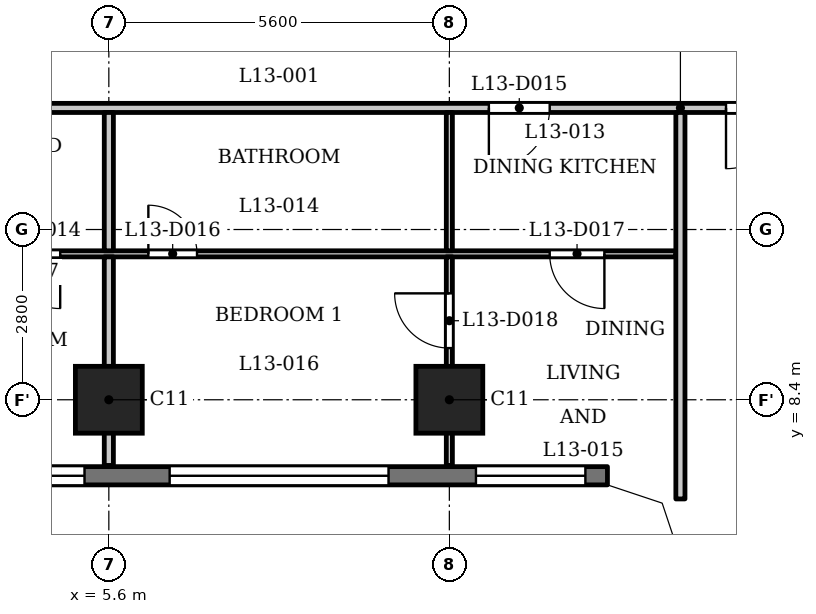
"""IFC4 building model, lengths in metres.
Left out: names, types, materials, properties, quantities, classifications, styles, units other than length and angle.
Written with IfcOpenShell. Run it as: python <this file> out.ifc"""

import sys

from ifc_helpers import new_model, si_unit, direction, frame, frame_2d, origin, origin_2d, place, context, subcontext, project, spatial, polyline, rectangle, outline, extrude, element, fill, save


model = new_model("IFC4")
c1 = context("Model", 3, precision=1e-05, world=origin(), true_north=direction((0.0, 1.0)))
c2 = subcontext(c1, "Body", "Model", "MODEL_VIEW")
j1 = project(units=[si_unit("LENGTHUNIT", "METRE"), si_unit("PLANEANGLEUNIT", "RADIAN")], contexts=[c1])
p1 = place(None, origin())
s1 = spatial("IfcSite", under=j1, at=p1, CompositionType="ELEMENT")
p2 = place(p1, origin())
s2 = spatial("IfcBuilding", under=s1, at=p2, CompositionType="ELEMENT")
p3 = place(p2, frame((0.0, 0.0, 55.0)))
s3 = spatial("IfcBuildingStorey", under=s2, at=p3, CompositionType="ELEMENT", Elevation=55.0)
for number, where, z_axis, x_axis in (
    (1, (5.6, 8.4, 0.0), (0.0, 0.0, 1.0), (1.0, 0.0, 0.0)),
    (2, (11.2, 8.4, 0.0), (0.0, 0.0, 1.0), (1.0, 0.0, 0.0)),
):
    element("IfcColumn", number, at=place(p3, frame(where, z_axis=z_axis, x_axis=x_axis)), inside=s3, PredefinedType="COLUMN", context=c2, shape_type="SweptSolid", body=[
        extrude(rectangle(XDim=1.1, YDim=1.1, at=origin_2d()), origin(), (0.0, 0.0, 1.0), 3.5),
    ])
p4 = place(p3, frame((-13.8, 7.15, 0.0), z_axis=(0.0, 0.0, 1.0), x_axis=(1.0, 0.0, 0.0)))
e3 = element("IfcWall", 3, at=p4, inside=s3, PredefinedType="SOLIDWALL", context=c2, shape_type="SweptSolid", body=[
    extrude(rectangle(XDim=27.6, YDim=0.3, at=frame_2d((13.8, 0.0))), origin(), (0.0, 0.0, 1.0), 3.2),
])
p5 = place(p4, frame((0.363, 0.0, 0.9)))
e4 = element("IfcOpeningElement", 4, at=p5, cuts=e3, PredefinedType="OPENING", context=c2, shape_type="SweptSolid", body=[
    extrude(rectangle(XDim=1.8, YDim=1.25, at=frame_2d((0.9, 0.625))), frame((0.0, 0.16, 0.0), z_axis=(0.0, -1.0, 0.0), x_axis=(1.0, 0.0, 0.0)), (0.0, 0.0, 1.0), 0.32),
])
p6 = place(p4, frame((3.6, 0.0, 1.2)))
e5 = element("IfcOpeningElement", 5, at=p6, cuts=e3, PredefinedType="OPENING", context=c2, shape_type="SweptSolid", body=[
    extrude(rectangle(XDim=3.6, YDim=0.95, at=frame_2d((1.8, 0.475))), frame((0.0, 0.16, 0.0), z_axis=(0.0, -1.0, 0.0), x_axis=(1.0, 0.0, 0.0)), (0.0, 0.0, 1.0), 0.32),
])
p7 = place(p4, frame((9.2, 0.0, 1.2)))
e6 = element("IfcOpeningElement", 6, at=p7, cuts=e3, PredefinedType="OPENING", context=c2, shape_type="SweptSolid", body=[
    extrude(rectangle(XDim=3.6, YDim=0.95, at=frame_2d((1.8, 0.475))), frame((0.0, 0.16, 0.0), z_axis=(0.0, -1.0, 0.0), x_axis=(1.0, 0.0, 0.0)), (0.0, 0.0, 1.0), 0.32),
])
p8 = place(p4, frame((14.4, 0.0, 0.9)))
e7 = element("IfcOpeningElement", 7, at=p8, cuts=e3, PredefinedType="OPENING", context=c2, shape_type="SweptSolid", body=[
    extrude(rectangle(XDim=1.8, YDim=1.25, at=frame_2d((0.9, 0.625))), frame((0.0, 0.16, 0.0), z_axis=(0.0, -1.0, 0.0), x_axis=(1.0, 0.0, 0.0)), (0.0, 0.0, 1.0), 0.32),
])
p9 = place(p4, frame((17.2, 0.0, 0.9)))
e8 = element("IfcOpeningElement", 8, at=p9, cuts=e3, PredefinedType="OPENING", context=c2, shape_type="SweptSolid", body=[
    extrude(rectangle(XDim=1.8, YDim=1.25, at=frame_2d((0.9, 0.625))), frame((0.0, 0.16, 0.0), z_axis=(0.0, -1.0, 0.0), x_axis=(1.0, 0.0, 0.0)), (0.0, 0.0, 1.0), 0.32),
])
p10 = place(p4, frame((20.4, 0.0, 1.2)))
e9 = element("IfcOpeningElement", 9, at=p10, cuts=e3, PredefinedType="OPENING", context=c2, shape_type="SweptSolid", body=[
    extrude(rectangle(XDim=3.6, YDim=0.95, at=frame_2d((1.8, 0.475))), frame((0.0, 0.16, 0.0), z_axis=(0.0, -1.0, 0.0), x_axis=(1.0, 0.0, 0.0)), (0.0, 0.0, 1.0), 0.32),
])
p11 = place(p4, frame((25.438, 0.0, 0.9)))
e10 = element("IfcOpeningElement", 10, at=p11, cuts=e3, PredefinedType="OPENING", context=c2, shape_type="SweptSolid", body=[
    extrude(rectangle(XDim=1.8, YDim=1.25, at=frame_2d((0.9, 0.625))), frame((0.0, 0.16, 0.0), z_axis=(0.0, -1.0, 0.0), x_axis=(1.0, 0.0, 0.0)), (0.0, 0.0, 1.0), 0.32),
])
p12 = place(p3, frame((-14.925, 10.8, 0.0), z_axis=(0.0, 0.0, 1.0), x_axis=(1.0, 0.0, 0.0)))
e11 = element("IfcWall", 11, at=p12, inside=s3, PredefinedType="PARTITIONING", context=c2, shape_type="SweptSolid", body=[
    extrude(rectangle(XDim=29.85, YDim=0.1, at=frame_2d((14.925, 0.0))), origin(), (0.0, 0.0, 1.0), 3.2),
])
p13 = place(p12, frame((0.525, 0.0, 0.0)))
e12 = element("IfcOpeningElement", 12, at=p13, cuts=e11, PredefinedType="OPENING", context=c2, shape_type="SweptSolid", body=[
    extrude(rectangle(XDim=0.8, YDim=2.1, at=frame_2d((0.4, 1.05))), frame((0.0, 0.06, 0.0), z_axis=(0.0, -1.0, 0.0), x_axis=(1.0, 0.0, 0.0)), (0.0, 0.0, 1.0), 0.12),
])
p14 = place(p12, frame((5.375, 0.0, 0.0)))
e13 = element("IfcOpeningElement", 13, at=p14, cuts=e11, PredefinedType="OPENING", context=c2, shape_type="SweptSolid", body=[
    extrude(rectangle(XDim=0.9, YDim=2.1, at=frame_2d((0.45, 1.05))), frame((0.0, 0.06, 0.0), z_axis=(0.0, -1.0, 0.0), x_axis=(1.0, 0.0, 0.0)), (0.0, 0.0, 1.0), 0.12),
])
p15 = place(p12, frame((10.875, 0.0, 0.0)))
e14 = element("IfcOpeningElement", 14, at=p15, cuts=e11, PredefinedType="OPENING", context=c2, shape_type="SweptSolid", body=[
    extrude(rectangle(XDim=0.8, YDim=2.1, at=frame_2d((0.4, 1.05))), frame((0.0, 0.06, 0.0), z_axis=(0.0, -1.0, 0.0), x_axis=(1.0, 0.0, 0.0)), (0.0, 0.0, 1.0), 0.12),
])
p16 = place(p12, frame((12.975, 0.0, 0.0)))
e15 = element("IfcOpeningElement", 15, at=p16, cuts=e11, PredefinedType="OPENING", context=c2, shape_type="SweptSolid", body=[
    extrude(rectangle(XDim=0.9, YDim=2.1, at=frame_2d((0.45, 1.05))), frame((0.0, 0.06, 0.0), z_axis=(0.0, -1.0, 0.0), x_axis=(1.0, 0.0, 0.0)), (0.0, 0.0, 1.0), 0.12),
])
p17 = place(p12, frame((16.575, 0.0, 0.0)))
e16 = element("IfcOpeningElement", 16, at=p17, cuts=e11, PredefinedType="OPENING", context=c2, shape_type="SweptSolid", body=[
    extrude(rectangle(XDim=0.9, YDim=2.1, at=frame_2d((0.45, 1.05))), frame((0.0, 0.06, 0.0), z_axis=(0.0, -1.0, 0.0), x_axis=(1.0, 0.0, 0.0)), (0.0, 0.0, 1.0), 0.12),
])
p18 = place(p12, frame((18.825, 0.0, 0.0)))
e17 = element("IfcOpeningElement", 17, at=p18, cuts=e11, PredefinedType="OPENING", context=c2, shape_type="SweptSolid", body=[
    extrude(rectangle(XDim=0.9, YDim=2.1, at=frame_2d((0.45, 1.05))), frame((0.0, 0.06, 0.0), z_axis=(0.0, -1.0, 0.0), x_axis=(1.0, 0.0, 0.0)), (0.0, 0.0, 1.0), 0.12),
])
p19 = place(p12, frame((21.175, 0.0, 0.0)))
e18 = element("IfcOpeningElement", 18, at=p19, cuts=e11, PredefinedType="OPENING", context=c2, shape_type="SweptSolid", body=[
    extrude(rectangle(XDim=0.8, YDim=2.1, at=frame_2d((0.4, 1.05))), frame((0.0, 0.06, 0.0), z_axis=(0.0, -1.0, 0.0), x_axis=(1.0, 0.0, 0.0)), (0.0, 0.0, 1.0), 0.12),
])
p20 = place(p12, frame((27.775, 0.0, 0.0)))
e19 = element("IfcOpeningElement", 19, at=p20, cuts=e11, PredefinedType="OPENING", context=c2, shape_type="SweptSolid", body=[
    extrude(rectangle(XDim=0.9, YDim=2.1, at=frame_2d((0.45, 1.05))), frame((0.0, 0.06, 0.0), z_axis=(0.0, -1.0, 0.0), x_axis=(1.0, 0.0, 0.0)), (0.0, 0.0, 1.0), 0.12),
])
p21 = place(p3, frame((-17.4, 13.2, 0.0), z_axis=(0.0, 0.0, 1.0), x_axis=(1.0, 0.0, 0.0)))
e20 = element("IfcWall", 20, at=p21, inside=s3, PredefinedType="PARTITIONING", context=c2, shape_type="SweptSolid", body=[
    extrude(rectangle(XDim=34.8, YDim=0.15, at=frame_2d((17.4, 0.0))), origin(), (0.0, 0.0, 1.0), 3.2),
])
p22 = place(p21, frame((0.75, 0.0, 0.0)))
e21 = element("IfcOpeningElement", 21, at=p22, cuts=e20, PredefinedType="OPENING", context=c2, shape_type="SweptSolid", body=[
    extrude(rectangle(XDim=1.0, YDim=2.1, at=frame_2d((0.5, 1.05))), frame((0.0, 0.085, 0.0), z_axis=(0.0, -1.0, 0.0), x_axis=(1.0, 0.0, 0.0)), (0.0, 0.0, 1.0), 0.17),
])
p23 = place(p21, frame((33.15, 0.0, 0.0)))
e22 = element("IfcOpeningElement", 22, at=p23, cuts=e20, PredefinedType="OPENING", context=c2, shape_type="SweptSolid", body=[
    extrude(rectangle(XDim=1.0, YDim=2.1, at=frame_2d((0.5, 1.05))), frame((0.0, 0.085, 0.0), z_axis=(0.0, -1.0, 0.0), x_axis=(1.0, 0.0, 0.0)), (0.0, 0.0, 1.0), 0.17),
])
p24 = place(p21, frame((6.85, 0.0, 0.0)))
e23 = element("IfcOpeningElement", 23, at=p24, cuts=e20, PredefinedType="OPENING", context=c2, shape_type="SweptSolid", body=[
    extrude(rectangle(XDim=1.0, YDim=2.1, at=frame_2d((0.5, 1.05))), frame((0.0, 0.085, 0.0), z_axis=(0.0, -1.0, 0.0), x_axis=(1.0, 0.0, 0.0)), (0.0, 0.0, 1.0), 0.17),
])
p25 = place(p21, frame((18.05, 0.0, 0.0)))
e24 = element("IfcOpeningElement", 24, at=p25, cuts=e20, PredefinedType="OPENING", context=c2, shape_type="SweptSolid", body=[
    extrude(rectangle(XDim=1.0, YDim=2.1, at=frame_2d((0.5, 1.05))), frame((0.0, 0.085, 0.0), z_axis=(0.0, -1.0, 0.0), x_axis=(1.0, 0.0, 0.0)), (0.0, 0.0, 1.0), 0.17),
])
p26 = place(p21, frame((29.25, 0.0, 0.0)))
e25 = element("IfcOpeningElement", 25, at=p26, cuts=e20, PredefinedType="OPENING", context=c2, shape_type="SweptSolid", body=[
    extrude(rectangle(XDim=1.0, YDim=2.1, at=frame_2d((0.5, 1.05))), frame((0.0, 0.085, 0.0), z_axis=(0.0, -1.0, 0.0), x_axis=(1.0, 0.0, 0.0)), (0.0, 0.0, 1.0), 0.17),
])
p27 = place(p3, frame((5.6, 7.32, 0.0), z_axis=(0.0, 0.0, 1.0), x_axis=(0.0, 1.0, 0.0)))
e26 = element("IfcWall", 26, at=p27, inside=s3, PredefinedType="PARTITIONING", context=c2, shape_type="SweptSolid", body=[
    extrude(rectangle(XDim=3.43, YDim=0.15, at=frame_2d((1.715, 0.0))), origin(), (0.0, 0.0, 1.0), 3.2),
])
p28 = place(p3, frame((5.6, 10.85, 0.0), z_axis=(0.0, 0.0, 1.0), x_axis=(0.0, 1.0, 0.0)))
e27 = element("IfcWall", 27, at=p28, inside=s3, PredefinedType="PARTITIONING", context=c2, shape_type="SweptSolid", body=[
    extrude(rectangle(XDim=2.275, YDim=0.15, at=frame_2d((1.137, 0.0))), origin(), (0.0, 0.0, 1.0), 3.2),
])
p29 = place(p3, frame((11.2, 7.32, 0.0), z_axis=(0.0, 0.0, 1.0), x_axis=(0.0, 1.0, 0.0)))
e28 = element("IfcWall", 28, at=p29, inside=s3, PredefinedType="PARTITIONING", context=c2, shape_type="SweptSolid", body=[
    extrude(rectangle(XDim=3.43, YDim=0.1, at=frame_2d((1.715, 0.0))), origin(), (0.0, 0.0, 1.0), 3.2),
])
p30 = place(p29, frame((1.93, 0.0, 0.0)))
e29 = element("IfcOpeningElement", 29, at=p30, cuts=e28, PredefinedType="OPENING", context=c2, shape_type="SweptSolid", body=[
    extrude(rectangle(XDim=0.9, YDim=2.1, at=frame_2d((0.45, 1.05))), frame((0.0, 0.06, 0.0), z_axis=(0.0, -1.0, 0.0), x_axis=(1.0, 0.0, 0.0)), (0.0, 0.0, 1.0), 0.12),
])
p31 = place(p3, frame((11.2, 10.85, 0.0), z_axis=(0.0, 0.0, 1.0), x_axis=(0.0, 1.0, 0.0)))
e30 = element("IfcWall", 30, at=p31, inside=s3, PredefinedType="PARTITIONING", context=c2, shape_type="SweptSolid", body=[
    extrude(rectangle(XDim=2.275, YDim=0.1, at=frame_2d((1.137, 0.0))), origin(), (0.0, 0.0, 1.0), 3.2),
])
p32 = place(p3, frame((15.0, 6.769, 0.0), z_axis=(0.0, 0.0, 1.0), x_axis=(0.0, 1.0, 0.0)))
e31 = element("IfcWall", 31, at=p32, inside=s3, PredefinedType="PARTITIONING", context=c2, shape_type="SweptSolid", body=[
    extrude(rectangle(XDim=6.356, YDim=0.15, at=frame_2d((3.178, 0.0))), origin(), (0.0, 0.0, 1.0), 3.2),
])
p33 = place(p3, origin())
e32 = element("IfcWall", 32, at=p33, inside=s3, PredefinedType="SOLIDWALL", context=c2, shape_type="SweptSolid", body=[
    extrude(outline(polyline([(14.937, 6.937), (13.849, 7.3), (13.8, 7.3), (13.8, 7.0), (14.7, 6.7), (15.0, 5.8), (15.3, 5.8), (15.3, 5.849), (14.937, 6.937)])), origin(), (0.0, 0.0, 1.0), 3.2),
])
p34 = place(p23, origin())
e33 = element("IfcDoor", 33, at=p34, inside=s3, OperationType="SINGLE_SWING_LEFT", PredefinedType="DOOR", context=c2, shape_type="SweptSolid", body=[
    extrude(rectangle(XDim=1.0, YDim=2.1, at=frame_2d((0.5, 1.05))), frame((0.0, 0.025, 0.0), z_axis=(0.0, -1.0, 0.0), x_axis=(1.0, 0.0, 0.0)), (0.0, 0.0, 1.0), 0.05),
])
fill(e22, e33)
p35 = place(p18, origin())
e34 = element("IfcDoor", 34, at=p35, inside=s3, OperationType="SINGLE_SWING_RIGHT", PredefinedType="DOOR", context=c2, shape_type="SweptSolid", body=[
    extrude(rectangle(XDim=0.9, YDim=2.1, at=frame_2d((0.45, 1.05))), frame((0.0, 0.025, 0.0), z_axis=(0.0, -1.0, 0.0), x_axis=(1.0, 0.0, 0.0)), (0.0, 0.0, 1.0), 0.05),
])
fill(e17, e34)
p36 = place(p26, origin())
e35 = element("IfcDoor", 35, at=p36, inside=s3, OperationType="SINGLE_SWING_LEFT", PredefinedType="DOOR", context=c2, shape_type="SweptSolid", body=[
    extrude(rectangle(XDim=1.0, YDim=2.1, at=frame_2d((0.5, 1.05))), frame((0.0, 0.025, 0.0), z_axis=(0.0, -1.0, 0.0), x_axis=(1.0, 0.0, 0.0)), (0.0, 0.0, 1.0), 0.05),
])
fill(e25, e35)
p37 = place(p19, origin())
e36 = element("IfcDoor", 36, at=p37, inside=s3, OperationType="SINGLE_SWING_RIGHT", PredefinedType="DOOR", context=c2, shape_type="SweptSolid", body=[
    extrude(rectangle(XDim=0.8, YDim=2.1, at=frame_2d((0.4, 1.05))), frame((0.0, 0.025, 0.0), z_axis=(0.0, -1.0, 0.0), x_axis=(1.0, 0.0, 0.0)), (0.0, 0.0, 1.0), 0.05),
])
fill(e18, e36)
p38 = place(p20, origin())
e37 = element("IfcDoor", 37, at=p38, inside=s3, OperationType="SINGLE_SWING_RIGHT", PredefinedType="DOOR", context=c2, shape_type="SweptSolid", body=[
    extrude(rectangle(XDim=0.9, YDim=2.1, at=frame_2d((0.45, 1.05))), frame((0.0, 0.025, 0.0), z_axis=(0.0, -1.0, 0.0), x_axis=(1.0, 0.0, 0.0)), (0.0, 0.0, 1.0), 0.05),
])
fill(e19, e37)
p39 = place(p30, origin())
e38 = element("IfcDoor", 38, at=p39, inside=s3, OperationType="SINGLE_SWING_LEFT", PredefinedType="DOOR", context=c2, shape_type="SweptSolid", body=[
    extrude(rectangle(XDim=0.9, YDim=2.1, at=frame_2d((0.45, 1.05))), frame((0.0, 0.025, 0.0), z_axis=(0.0, -1.0, 0.0), x_axis=(1.0, 0.0, 0.0)), (0.0, 0.0, 1.0), 0.05),
])
fill(e29, e38)
p40 = place(p9, origin())
e39 = element("IfcWindow", 39, at=p40, inside=s3, PartitioningType="SINGLE_PANEL", PredefinedType="WINDOW", context=c2, shape_type="SweptSolid", body=[
    extrude(rectangle(XDim=1.8, YDim=1.25, at=frame_2d((0.9, 0.625))), frame((0.0, 0.03, 0.0), z_axis=(0.0, -1.0, 0.0), x_axis=(1.0, 0.0, 0.0)), (0.0, 0.0, 1.0), 0.06),
])
fill(e8, e39)
p41 = place(p10, origin())
e40 = element("IfcWindow", 40, at=p41, inside=s3, PartitioningType="SINGLE_PANEL", PredefinedType="WINDOW", context=c2, shape_type="SweptSolid", body=[
    extrude(rectangle(XDim=3.6, YDim=0.95, at=frame_2d((1.8, 0.475))), frame((0.0, 0.03, 0.0), z_axis=(0.0, -1.0, 0.0), x_axis=(1.0, 0.0, 0.0)), (0.0, 0.0, 1.0), 0.06),
])
fill(e9, e40)
p42 = place(p11, origin())
e41 = element("IfcWindow", 41, at=p42, inside=s3, PartitioningType="SINGLE_PANEL", PredefinedType="WINDOW", context=c2, shape_type="SweptSolid", body=[
    extrude(rectangle(XDim=1.8, YDim=1.25, at=frame_2d((0.9, 0.625))), frame((0.0, 0.03, 0.0), z_axis=(0.0, -1.0, 0.0), x_axis=(1.0, 0.0, 0.0)), (0.0, 0.0, 1.0), 0.06),
])
fill(e10, e41)
save(model, sys.argv[1])
